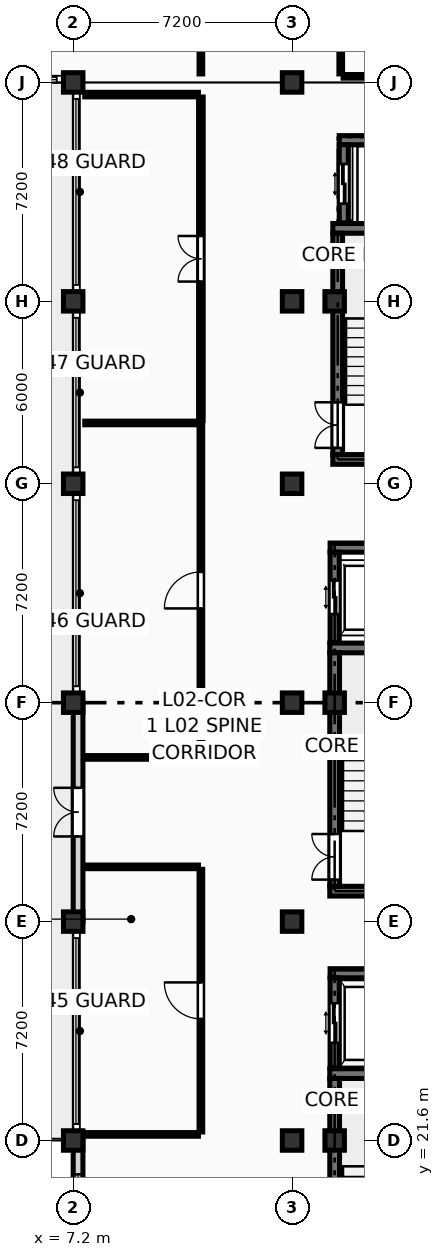
"""IFC4 building model, lengths in metres.
Left out: names, types, materials, properties, quantities, classifications, styles, units other than length and angle.
Written with IfcOpenShell. Run it as: python <this file> out.ifc"""

import sys

from ifc_helpers import new_model, si_unit, direction, frame, frame_2d, origin, origin_2d, place, context, subcontext, project, spatial, rectangle, extrude, element, fill, save


model = new_model("IFC4")
c1 = context("Model", 3, precision=1e-05, world=origin(), true_north=direction((0.0, 1.0)))
c2 = subcontext(c1, "Body", "Model", "MODEL_VIEW")
j1 = project(units=[si_unit("LENGTHUNIT", "METRE"), si_unit("PLANEANGLEUNIT", "RADIAN")], contexts=[c1])
p1 = place(None, origin())
s1 = spatial("IfcSite", under=j1, at=p1, CompositionType="ELEMENT")
p2 = place(p1, origin())
s2 = spatial("IfcBuilding", under=s1, at=p2, CompositionType="ELEMENT")
p3 = place(p2, frame((0.0, 0.0, 8.55)))
s3 = spatial("IfcBuildingStorey", under=s2, at=p3, CompositionType="ELEMENT", Elevation=8.55)
for number, where, z_axis, x_axis in (
    (1, (7.2, 21.6, 0.0), (0.0, 0.0, 1.0), (1.0, 0.0, 0.0)),
    (2, (7.2, 28.8, 0.0), (0.0, 0.0, 1.0), (1.0, 0.0, 0.0)),
    (3, (7.2, 36.0, 0.0), (0.0, 0.0, 1.0), (1.0, 0.0, 0.0)),
    (4, (7.2, 43.2, 0.0), (0.0, 0.0, 1.0), (1.0, 0.0, 0.0)),
    (5, (7.2, 49.2, 0.0), (0.0, 0.0, 1.0), (1.0, 0.0, 0.0)),
    (6, (7.2, 56.4, 0.0), (0.0, 0.0, 1.0), (1.0, 0.0, 0.0)),
    (7, (14.4, 21.6, 0.0), (0.0, 0.0, 1.0), (1.0, 0.0, 0.0)),
    (8, (14.4, 28.8, 0.0), (0.0, 0.0, 1.0), (1.0, 0.0, 0.0)),
    (9, (14.4, 36.0, 0.0), (0.0, 0.0, 1.0), (1.0, 0.0, 0.0)),
    (10, (14.4, 43.2, 0.0), (0.0, 0.0, 1.0), (1.0, 0.0, 0.0)),
    (11, (14.4, 49.2, 0.0), (0.0, 0.0, 1.0), (1.0, 0.0, 0.0)),
    (12, (14.4, 56.4, 0.0), (0.0, 0.0, 1.0), (1.0, 0.0, 0.0)),
    (13, (15.8, 21.6, 0.0), (0.0, 0.0, 1.0), (1.0, 0.0, 0.0)),
    (14, (15.8, 36.0, 0.0), (0.0, 0.0, 1.0), (1.0, 0.0, 0.0)),
    (15, (15.8, 49.2, 0.0), (0.0, 0.0, 1.0), (1.0, 0.0, 0.0)),
):
    element("IfcColumn", number, at=place(p3, frame(where, z_axis=z_axis, x_axis=x_axis)), inside=s3, PredefinedType="COLUMN", context=c2, shape_type="SweptSolid", body=[
        extrude(rectangle(XDim=0.64, YDim=0.64, at=origin_2d()), origin(), (0.0, 0.0, 1.0), 3.6),
    ])
p4 = place(p3, frame((7.36, 14.4, 0.0), z_axis=(0.0, 0.0, 1.0), x_axis=(0.0, 1.0, 0.0)))
e16 = element("IfcWall", 16, at=p4, inside=s3, PredefinedType="SOLIDWALL", context=c2, shape_type="SweptSolid", body=[
    extrude(rectangle(XDim=7.2, YDim=0.32, at=frame_2d((3.6, 0.0))), origin(), (0.0, 0.0, 1.0), 2.84),
])
p5 = place(p4, frame((1.113, 0.0, 0.18)))
e17 = element("IfcOpeningElement", 17, at=p5, cuts=e16, PredefinedType="OPENING", context=c2, shape_type="SweptSolid", body=[
    extrude(rectangle(XDim=1.35, YDim=2.45, at=frame_2d((0.675, 1.225))), frame((0.0, 0.172, 0.0), z_axis=(0.0, -1.0, 0.0), x_axis=(1.0, 0.0, 0.0)), (0.0, 0.0, 1.0), 0.344),
])
p6 = place(p4, frame((2.925, 0.0, 0.18)))
e18 = element("IfcOpeningElement", 18, at=p6, cuts=e16, PredefinedType="OPENING", context=c2, shape_type="SweptSolid", body=[
    extrude(rectangle(XDim=1.35, YDim=2.45, at=frame_2d((0.675, 1.225))), frame((0.0, 0.172, 0.0), z_axis=(0.0, -1.0, 0.0), x_axis=(1.0, 0.0, 0.0)), (0.0, 0.0, 1.0), 0.344),
])
p7 = place(p4, frame((4.738, 0.0, 0.18)))
e19 = element("IfcOpeningElement", 19, at=p7, cuts=e16, PredefinedType="OPENING", context=c2, shape_type="SweptSolid", body=[
    extrude(rectangle(XDim=1.35, YDim=2.45, at=frame_2d((0.675, 1.225))), frame((0.0, 0.172, 0.0), z_axis=(0.0, -1.0, 0.0), x_axis=(1.0, 0.0, 0.0)), (0.0, 0.0, 1.0), 0.344),
])
p8 = place(p3, frame((7.36, 28.8, 0.0), z_axis=(0.0, 0.0, 1.0), x_axis=(0.0, 1.0, 0.0)))
e20 = element("IfcWall", 20, at=p8, inside=s3, PredefinedType="SOLIDWALL", context=c2, shape_type="SweptSolid", body=[
    extrude(rectangle(XDim=7.2, YDim=0.32, at=frame_2d((3.6, 0.0))), origin(), (0.0, 0.0, 1.0), 2.84),
])
p9 = place(p8, frame((2.8, 0.0, 0.0)))
e21 = element("IfcOpeningElement", 21, at=p9, cuts=e20, PredefinedType="OPENING", context=c2, shape_type="SweptSolid", body=[
    extrude(rectangle(XDim=1.6, YDim=2.25, at=frame_2d((0.8, 1.125))), frame((0.0, 0.172, 0.0), z_axis=(0.0, -1.0, 0.0), x_axis=(1.0, 0.0, 0.0)), (0.0, 0.0, 1.0), 0.344),
])
p10 = place(p3, frame((15.64, 23.8, 0.0), z_axis=(0.0, 0.0, 1.0), x_axis=(1.0, 0.0, 0.0)))
e22 = element("IfcWall", 22, at=p10, inside=s3, PredefinedType="SHEAR", context=c2, shape_type="SweptSolid", body=[
    extrude(rectangle(XDim=4.84, YDim=0.32, at=frame_2d((2.42, 0.0))), origin(), (0.0, 0.0, 1.0), 3.39),
])
p11 = place(p3, frame((15.8, 15.96, 0.0), z_axis=(0.0, 0.0, 1.0), x_axis=(0.0, 1.0, 0.0)))
e23 = element("IfcWall", 23, at=p11, inside=s3, PredefinedType="SHEAR", context=c2, shape_type="SweptSolid", body=[
    extrude(rectangle(XDim=7.68, YDim=0.32, at=frame_2d((3.84, 0.0))), origin(), (0.0, 0.0, 1.0), 3.39),
])
p12 = place(p11, frame((0.22, 0.0, 0.0)))
e24 = element("IfcOpeningElement", 24, at=p12, cuts=e23, PredefinedType="OPENING", context=c2, shape_type="SweptSolid", body=[
    extrude(rectangle(XDim=1.5, YDim=2.2, at=frame_2d((0.75, 1.1))), frame((0.0, 0.172, 0.0), z_axis=(0.0, -1.0, 0.0), x_axis=(1.0, 0.0, 0.0)), (0.0, 0.0, 1.0), 0.344),
])
for number, where, z_axis, x_axis in (
    (25, (15.64, 29.8, 0.0), (0.0, 0.0, 1.0), (1.0, 0.0, 0.0)),
    (26, (15.64, 37.8, 0.0), (0.0, 0.0, 1.0), (1.0, 0.0, 0.0)),
):
    element("IfcWall", number, at=place(p3, frame(where, z_axis=z_axis, x_axis=x_axis)), inside=s3, PredefinedType="SHEAR", context=c2, shape_type="SweptSolid", body=[
        extrude(rectangle(XDim=4.84, YDim=0.32, at=frame_2d((2.42, 0.0))), origin(), (0.0, 0.0, 1.0), 3.39),
    ])
p13 = place(p3, frame((15.8, 29.96, 0.0), z_axis=(0.0, 0.0, 1.0), x_axis=(0.0, 1.0, 0.0)))
e27 = element("IfcWall", 27, at=p13, inside=s3, PredefinedType="SHEAR", context=c2, shape_type="SweptSolid", body=[
    extrude(rectangle(XDim=7.68, YDim=0.32, at=frame_2d((3.84, 0.0))), origin(), (0.0, 0.0, 1.0), 3.39),
])
p14 = place(p13, frame((0.22, 0.0, 0.0)))
e28 = element("IfcOpeningElement", 28, at=p14, cuts=e27, PredefinedType="OPENING", context=c2, shape_type="SweptSolid", body=[
    extrude(rectangle(XDim=1.5, YDim=2.2, at=frame_2d((0.75, 1.1))), frame((0.0, 0.172, 0.0), z_axis=(0.0, -1.0, 0.0), x_axis=(1.0, 0.0, 0.0)), (0.0, 0.0, 1.0), 0.344),
])
for number, where, z_axis, x_axis in (
    (29, (15.74, 44.0, 0.0), (0.0, 0.0, 1.0), (1.0, 0.0, 0.0)),
    (30, (15.74, 51.6, 0.0), (0.0, 0.0, 1.0), (1.0, 0.0, 0.0)),
):
    element("IfcWall", number, at=place(p3, frame(where, z_axis=z_axis, x_axis=x_axis)), inside=s3, PredefinedType="SHEAR", context=c2, shape_type="SweptSolid", body=[
        extrude(rectangle(XDim=4.44, YDim=0.32, at=frame_2d((2.22, 0.0))), origin(), (0.0, 0.0, 1.0), 3.39),
    ])
p15 = place(p3, frame((15.9, 44.16, 0.0), z_axis=(0.0, 0.0, 1.0), x_axis=(0.0, 1.0, 0.0)))
e31 = element("IfcWall", 31, at=p15, inside=s3, PredefinedType="SHEAR", context=c2, shape_type="SweptSolid", body=[
    extrude(rectangle(XDim=7.28, YDim=0.32, at=frame_2d((3.64, 0.0))), origin(), (0.0, 0.0, 1.0), 3.39),
])
p16 = place(p15, frame((0.22, 0.0, 0.0)))
e32 = element("IfcOpeningElement", 32, at=p16, cuts=e31, PredefinedType="OPENING", context=c2, shape_type="SweptSolid", body=[
    extrude(rectangle(XDim=1.5, YDim=2.2, at=frame_2d((0.75, 1.1))), frame((0.0, 0.172, 0.0), z_axis=(0.0, -1.0, 0.0), x_axis=(1.0, 0.0, 0.0)), (0.0, 0.0, 1.0), 0.344),
])
p17 = place(p3, frame((15.65, 27.1, 0.0), z_axis=(0.0, 0.0, 1.0), x_axis=(1.0, 0.0, 0.0)))
e33 = element("IfcWall", 33, at=p17, inside=s3, PredefinedType="SHEAR", context=c2, shape_type="SweptSolid", body=[
    extrude(rectangle(XDim=2.56, YDim=0.3, at=frame_2d((1.28, 0.0))), origin(), (0.0, 0.0, 1.0), 3.39),
])
p18 = place(p3, frame((15.8, 23.98, 0.0), z_axis=(0.0, 0.0, 1.0), x_axis=(0.0, 1.0, 0.0)))
e34 = element("IfcWall", 34, at=p18, inside=s3, PredefinedType="SHEAR", context=c2, shape_type="SweptSolid", body=[
    extrude(rectangle(XDim=2.97, YDim=0.3, at=frame_2d((1.485, 0.0))), origin(), (0.0, 0.0, 1.0), 3.39),
])
p19 = place(p18, frame((0.835, 0.0, 0.0)))
e35 = element("IfcOpeningElement", 35, at=p19, cuts=e34, PredefinedType="OPENING", context=c2, shape_type="SweptSolid", body=[
    extrude(rectangle(XDim=1.3, YDim=2.25, at=frame_2d((0.65, 1.125))), frame((0.0, 0.162, 0.0), z_axis=(0.0, -1.0, 0.0), x_axis=(1.0, 0.0, 0.0)), (0.0, 0.0, 1.0), 0.324),
])
p20 = place(p3, frame((15.65, 41.1, 0.0), z_axis=(0.0, 0.0, 1.0), x_axis=(1.0, 0.0, 0.0)))
e36 = element("IfcWall", 36, at=p20, inside=s3, PredefinedType="SHEAR", context=c2, shape_type="SweptSolid", body=[
    extrude(rectangle(XDim=2.56, YDim=0.3, at=frame_2d((1.28, 0.0))), origin(), (0.0, 0.0, 1.0), 3.39),
])
p21 = place(p3, frame((15.8, 37.98, 0.0), z_axis=(0.0, 0.0, 1.0), x_axis=(0.0, 1.0, 0.0)))
e37 = element("IfcWall", 37, at=p21, inside=s3, PredefinedType="SHEAR", context=c2, shape_type="SweptSolid", body=[
    extrude(rectangle(XDim=2.97, YDim=0.3, at=frame_2d((1.485, 0.0))), origin(), (0.0, 0.0, 1.0), 3.39),
])
p22 = place(p21, frame((0.935, 0.0, 0.0)))
e38 = element("IfcOpeningElement", 38, at=p22, cuts=e37, PredefinedType="OPENING", context=c2, shape_type="SweptSolid", body=[
    extrude(rectangle(XDim=1.1, YDim=2.2, at=frame_2d((0.55, 1.1))), frame((0.0, 0.162, 0.0), z_axis=(0.0, -1.0, 0.0), x_axis=(1.0, 0.0, 0.0)), (0.0, 0.0, 1.0), 0.324),
])
p23 = place(p3, frame((15.95, 54.5, 0.0), z_axis=(0.0, 0.0, 1.0), x_axis=(1.0, 0.0, 0.0)))
e39 = element("IfcWall", 39, at=p23, inside=s3, PredefinedType="SHEAR", context=c2, shape_type="SweptSolid", body=[
    extrude(rectangle(XDim=3.0, YDim=0.3, at=frame_2d((1.5, 0.0))), origin(), (0.0, 0.0, 1.0), 3.39),
])
p24 = place(p3, frame((16.1, 51.78, 0.0), z_axis=(0.0, 0.0, 1.0), x_axis=(0.0, 1.0, 0.0)))
e40 = element("IfcWall", 40, at=p24, inside=s3, PredefinedType="SHEAR", context=c2, shape_type="SweptSolid", body=[
    extrude(rectangle(XDim=2.57, YDim=0.3, at=frame_2d((1.285, 0.0))), origin(), (0.0, 0.0, 1.0), 3.39),
])
p25 = place(p24, frame((0.635, 0.0, 0.0)))
e41 = element("IfcOpeningElement", 41, at=p25, cuts=e40, PredefinedType="OPENING", context=c2, shape_type="SweptSolid", body=[
    extrude(rectangle(XDim=1.3, YDim=2.25, at=frame_2d((0.65, 1.125))), frame((0.0, 0.162, 0.0), z_axis=(0.0, -1.0, 0.0), x_axis=(1.0, 0.0, 0.0)), (0.0, 0.0, 1.0), 0.324),
])
p26 = place(p3, frame((7.58, 21.8, 0.0), z_axis=(0.0, 0.0, 1.0), x_axis=(1.0, 0.0, 0.0)))
e42 = element("IfcWall", 42, at=p26, inside=s3, PredefinedType="PARTITIONING", context=c2, shape_type="SweptSolid", body=[
    extrude(rectangle(XDim=3.74, YDim=0.12, at=frame_2d((1.87, 0.0))), origin(), (0.0, 0.0, 1.0), 2.595),
])
p27 = place(p3, frame((11.4, 21.88, 0.0), z_axis=(0.0, 0.0, 1.0), x_axis=(0.0, 1.0, 0.0)))
e43 = element("IfcWall", 43, at=p27, inside=s3, PredefinedType="PARTITIONING", context=c2, shape_type="SweptSolid", body=[
    extrude(rectangle(XDim=8.64, YDim=0.12, at=frame_2d((4.32, 0.0))), origin(), (0.0, 0.0, 1.0), 3.375),
])
p28 = place(p27, frame((3.72, 0.0, 0.0)))
e44 = element("IfcOpeningElement", 44, at=p28, cuts=e43, PredefinedType="OPENING", context=c2, shape_type="SweptSolid", body=[
    extrude(rectangle(XDim=1.2, YDim=2.15, at=frame_2d((0.6, 1.075))), frame((0.0, 0.072, 0.0), z_axis=(0.0, -1.0, 0.0), x_axis=(1.0, 0.0, 0.0)), (0.0, 0.0, 1.0), 0.144),
])
for number, where, z_axis, x_axis in (
    (45, (7.58, 30.6, 0.0), (0.0, 0.0, 1.0), (1.0, 0.0, 0.0)),
    (46, (7.58, 34.2, 0.0), (0.0, 0.0, 1.0), (1.0, 0.0, 0.0)),
):
    element("IfcWall", number, at=place(p3, frame(where, z_axis=z_axis, x_axis=x_axis)), inside=s3, PredefinedType="PARTITIONING", context=c2, shape_type="SweptSolid", body=[
        extrude(rectangle(XDim=3.74, YDim=0.12, at=frame_2d((1.87, 0.0))), origin(), (0.0, 0.0, 1.0), 3.375),
    ])
p29 = place(p3, frame((11.4, 34.28, 0.0), z_axis=(0.0, 0.0, 1.0), x_axis=(0.0, 1.0, 0.0)))
e47 = element("IfcWall", 47, at=p29, inside=s3, PredefinedType="PARTITIONING", context=c2, shape_type="SweptSolid", body=[
    extrude(rectangle(XDim=10.84, YDim=0.12, at=frame_2d((5.42, 0.0))), origin(), (0.0, 0.0, 1.0), 3.375),
])
p30 = place(p29, frame((4.82, 0.0, 0.0)))
e48 = element("IfcOpeningElement", 48, at=p30, cuts=e47, PredefinedType="OPENING", context=c2, shape_type="SweptSolid", body=[
    extrude(rectangle(XDim=1.2, YDim=2.15, at=frame_2d((0.6, 1.075))), frame((0.0, 0.072, 0.0), z_axis=(0.0, -1.0, 0.0), x_axis=(1.0, 0.0, 0.0)), (0.0, 0.0, 1.0), 0.144),
])
p31 = place(p3, frame((7.58, 45.2, 0.0), z_axis=(0.0, 0.0, 1.0), x_axis=(1.0, 0.0, 0.0)))
e49 = element("IfcWall", 49, at=p31, inside=s3, PredefinedType="PARTITIONING", context=c2, shape_type="SweptSolid", body=[
    extrude(rectangle(XDim=3.74, YDim=0.12, at=frame_2d((1.87, 0.0))), origin(), (0.0, 0.0, 1.0), 3.375),
])
p32 = place(p3, frame((11.4, 45.28, 0.0), z_axis=(0.0, 0.0, 1.0), x_axis=(0.0, 1.0, 0.0)))
e50 = element("IfcWall", 50, at=p32, inside=s3, PredefinedType="PARTITIONING", context=c2, shape_type="SweptSolid", body=[
    extrude(rectangle(XDim=10.64, YDim=0.15, at=frame_2d((5.32, 0.0))), origin(), (0.0, 0.0, 1.0), 3.375),
])
p33 = place(p32, frame((4.57, 0.0, 0.0)))
e51 = element("IfcOpeningElement", 51, at=p33, cuts=e50, PredefinedType="OPENING", context=c2, shape_type="SweptSolid", body=[
    extrude(rectangle(XDim=1.5, YDim=2.2, at=frame_2d((0.75, 1.1))), frame((0.0, 0.087, 0.0), z_axis=(0.0, -1.0, 0.0), x_axis=(1.0, 0.0, 0.0)), (0.0, 0.0, 1.0), 0.174),
])
p34 = place(p3, frame((7.58, 56.0, 0.0), z_axis=(0.0, 0.0, 1.0), x_axis=(1.0, 0.0, 0.0)))
e52 = element("IfcWall", 52, at=p34, inside=s3, PredefinedType="PARTITIONING", context=c2, shape_type="SweptSolid", body=[
    extrude(rectangle(XDim=3.74, YDim=0.15, at=frame_2d((1.87, 0.0))), origin(), (0.0, 0.0, 1.0), 3.375),
])
p35 = place(p3, frame((11.4, 56.68, 0.0), z_axis=(0.0, 0.0, 1.0), x_axis=(0.0, 1.0, 0.0)))
e53 = element("IfcWall", 53, at=p35, inside=s3, PredefinedType="PARTITIONING", context=c2, shape_type="SweptSolid", body=[
    extrude(rectangle(XDim=28.44, YDim=0.12, at=frame_2d((14.22, 0.0))), origin(), (0.0, 0.0, 1.0), 3.375),
])
p36 = place(p35, frame((13.37, 0.0, 0.0)))
e54 = element("IfcOpeningElement", 54, at=p36, cuts=e53, PredefinedType="OPENING", context=c2, shape_type="SweptSolid", body=[
    extrude(rectangle(XDim=1.7, YDim=2.28, at=frame_2d((0.85, 1.14))), frame((0.0, 0.072, 0.0), z_axis=(0.0, -1.0, 0.0), x_axis=(1.0, 0.0, 0.0)), (0.0, 0.0, 1.0), 0.144),
])
p37 = place(p3, frame((16.0, 56.68, 0.0), z_axis=(0.0, 0.0, 1.0), x_axis=(0.0, 1.0, 0.0)))
e55 = element("IfcWall", 55, at=p37, inside=s3, PredefinedType="PARTITIONING", context=c2, shape_type="SweptSolid", body=[
    extrude(rectangle(XDim=15.12, YDim=0.12, at=frame_2d((7.56, 0.0))), origin(), (0.0, 0.0, 1.0), 3.375),
])
p38 = place(p37, frame((8.364, 0.0, 0.0)))
e56 = element("IfcOpeningElement", 56, at=p38, cuts=e55, PredefinedType="OPENING", context=c2, shape_type="SweptSolid", body=[
    extrude(rectangle(XDim=1.2, YDim=2.15, at=frame_2d((0.6, 1.075))), frame((0.0, 0.072, 0.0), z_axis=(0.0, -1.0, 0.0), x_axis=(1.0, 0.0, 0.0)), (0.0, 0.0, 1.0), 0.144),
])
p39 = place(p3, frame((16.08, 56.6, 0.0), z_axis=(0.0, 0.0, 1.0), x_axis=(1.0, 0.0, 0.0)))
e57 = element("IfcWall", 57, at=p39, inside=s3, PredefinedType="PARTITIONING", context=c2, shape_type="SweptSolid", body=[
    extrude(rectangle(XDim=12.24, YDim=0.12, at=frame_2d((6.12, 0.0))), origin(), (0.0, 0.0, 1.0), 2.595),
])
p40 = place(p7, origin())
e58 = element("IfcWindow", 58, at=p40, inside=s3, PartitioningType="SINGLE_PANEL", PredefinedType="WINDOW", context=c2, shape_type="SweptSolid", body=[
    extrude(rectangle(XDim=1.35, YDim=2.45, at=frame_2d((0.675, 1.225))), frame((0.0, 0.03, 0.0), z_axis=(0.0, -1.0, 0.0), x_axis=(1.0, 0.0, 0.0)), (0.0, 0.0, 1.0), 0.06),
])
fill(e19, e58)
p41 = place(p9, origin())
e59 = element("IfcDoor", 59, at=p41, inside=s3, OperationType="DOUBLE_DOOR_SINGLE_SWING", PredefinedType="DOOR", context=c2, shape_type="SweptSolid", body=[
    extrude(rectangle(XDim=1.6, YDim=2.25, at=frame_2d((0.8, 1.125))), frame((0.0, 0.025, 0.0), z_axis=(0.0, -1.0, 0.0), x_axis=(1.0, 0.0, 0.0)), (0.0, 0.0, 1.0), 0.05),
])
fill(e21, e59)
p42 = place(p14, origin())
e60 = element("IfcDoor", 60, at=p42, inside=s3, OperationType="DOUBLE_DOOR_SINGLE_SWING", PredefinedType="DOOR", context=c2, shape_type="SweptSolid", body=[
    extrude(rectangle(XDim=1.5, YDim=2.2, at=frame_2d((0.75, 1.1))), frame((0.0, 0.025, 0.0), z_axis=(0.0, -1.0, 0.0), x_axis=(1.0, 0.0, 0.0)), (0.0, 0.0, 1.0), 0.05),
])
fill(e28, e60)
p43 = place(p16, origin())
e61 = element("IfcDoor", 61, at=p43, inside=s3, OperationType="DOUBLE_DOOR_SINGLE_SWING", PredefinedType="DOOR", context=c2, shape_type="SweptSolid", body=[
    extrude(rectangle(XDim=1.5, YDim=2.2, at=frame_2d((0.75, 1.1))), frame((0.0, 0.025, 0.0), z_axis=(0.0, -1.0, 0.0), x_axis=(1.0, 0.0, 0.0)), (0.0, 0.0, 1.0), 0.05),
])
fill(e32, e61)
p44 = place(p19, origin())
e62 = element("IfcDoor", 62, at=p44, inside=s3, OperationType="DOUBLE_DOOR_SLIDING", PredefinedType="DOOR", context=c2, shape_type="SweptSolid", body=[
    extrude(rectangle(XDim=1.3, YDim=2.25, at=frame_2d((0.65, 1.125))), frame((0.0, 0.025, 0.0), z_axis=(0.0, -1.0, 0.0), x_axis=(1.0, 0.0, 0.0)), (0.0, 0.0, 1.0), 0.05),
])
fill(e35, e62)
p45 = place(p22, origin())
e63 = element("IfcDoor", 63, at=p45, inside=s3, OperationType="DOUBLE_DOOR_SLIDING", PredefinedType="DOOR", context=c2, shape_type="SweptSolid", body=[
    extrude(rectangle(XDim=1.1, YDim=2.2, at=frame_2d((0.55, 1.1))), frame((0.0, 0.025, 0.0), z_axis=(0.0, -1.0, 0.0), x_axis=(1.0, 0.0, 0.0)), (0.0, 0.0, 1.0), 0.05),
])
fill(e38, e63)
p46 = place(p25, origin())
e64 = element("IfcDoor", 64, at=p46, inside=s3, OperationType="DOUBLE_DOOR_SLIDING", PredefinedType="DOOR", context=c2, shape_type="SweptSolid", body=[
    extrude(rectangle(XDim=1.3, YDim=2.25, at=frame_2d((0.65, 1.125))), frame((0.0, 0.025, 0.0), z_axis=(0.0, -1.0, 0.0), x_axis=(1.0, 0.0, 0.0)), (0.0, 0.0, 1.0), 0.05),
])
fill(e41, e64)
p47 = place(p28, origin())
e65 = element("IfcDoor", 65, at=p47, inside=s3, OperationType="SINGLE_SWING_RIGHT", PredefinedType="DOOR", context=c2, shape_type="SweptSolid", body=[
    extrude(rectangle(XDim=1.2, YDim=2.15, at=frame_2d((0.6, 1.075))), frame((0.0, 0.025, 0.0), z_axis=(0.0, -1.0, 0.0), x_axis=(1.0, 0.0, 0.0)), (0.0, 0.0, 1.0), 0.05),
])
fill(e44, e65)
p48 = place(p30, origin())
e66 = element("IfcDoor", 66, at=p48, inside=s3, OperationType="SINGLE_SWING_LEFT", PredefinedType="DOOR", context=c2, shape_type="SweptSolid", body=[
    extrude(rectangle(XDim=1.2, YDim=2.15, at=frame_2d((0.6, 1.075))), frame((0.0, 0.025, 0.0), z_axis=(0.0, -1.0, 0.0), x_axis=(1.0, 0.0, 0.0)), (0.0, 0.0, 1.0), 0.05),
])
fill(e48, e66)
p49 = place(p33, origin())
e67 = element("IfcDoor", 67, at=p49, inside=s3, OperationType="DOUBLE_DOOR_SINGLE_SWING", PredefinedType="DOOR", context=c2, shape_type="SweptSolid", body=[
    extrude(rectangle(XDim=1.5, YDim=2.2, at=frame_2d((0.75, 1.1))), frame((0.0, 0.025, 0.0), z_axis=(0.0, -1.0, 0.0), x_axis=(1.0, 0.0, 0.0)), (0.0, 0.0, 1.0), 0.05),
])
fill(e51, e67)
save(model, sys.argv[1])
